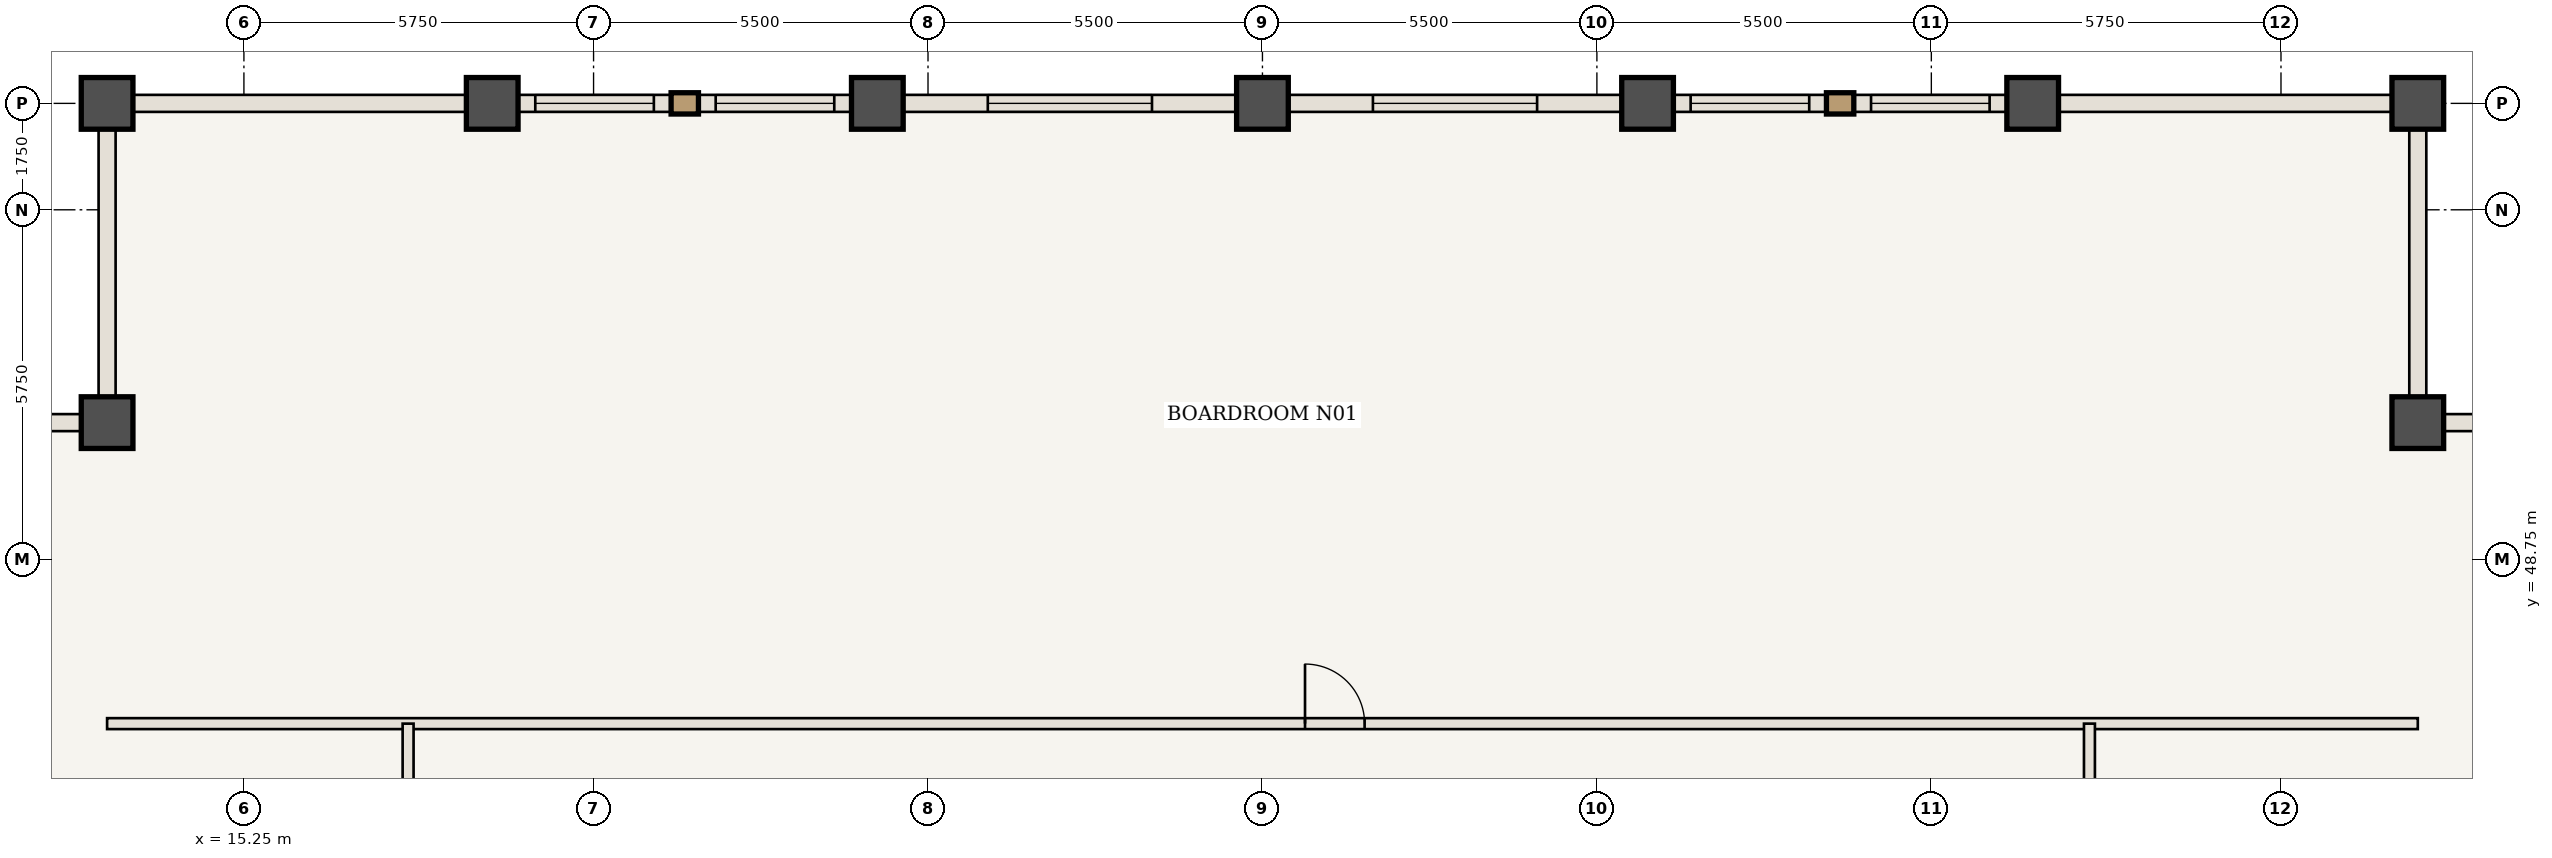
"""IFC4 building model, lengths in metres.
Left out: names, types, materials, properties, quantities, classifications, styles, units other than length and angle.
Written with IfcOpenShell. Run it as: python <this file> out.ifc"""

import sys

from ifc_helpers import new_model, si_unit, direction, frame, frame_2d, origin, origin_2d, place, context, subcontext, project, spatial, rectangle, extrude, element, fill, save


model = new_model("IFC4")
c1 = context("Model", 3, precision=1e-05, world=origin(), true_north=direction((0.0, 1.0)))
c2 = subcontext(c1, "Body", "Model", "MODEL_VIEW")
j1 = project(units=[si_unit("LENGTHUNIT", "METRE"), si_unit("PLANEANGLEUNIT", "RADIAN")], contexts=[c1])
p1 = place(None, origin())
s1 = spatial("IfcSite", under=j1, at=p1, CompositionType="ELEMENT")
p2 = place(p1, origin())
s2 = spatial("IfcBuilding", under=s1, at=p2, CompositionType="ELEMENT")
p3 = place(p2, frame((0.0, 0.0, 229.25)))
s3 = spatial("IfcBuildingStorey", under=s2, at=p3, CompositionType="ELEMENT", Elevation=229.25)
for number, where, z_axis, x_axis in (
    (1, (51.0, 51.0, 0.0), (0.0, 0.0, 1.0), (1.0, 0.0, 0.0)),
    (2, (51.0, 56.25, 0.0), (0.0, 0.0, 1.0), (1.0, 0.0, 0.0)),
    (3, (13.0, 56.25, 0.0), (0.0, 0.0, 1.0), (1.0, 0.0, 0.0)),
    (4, (13.0, 51.0, 0.0), (0.0, 0.0, 1.0), (1.0, 0.0, 0.0)),
    (5, (19.333, 56.25, 0.0), (0.0, 0.0, 1.0), (1.0, 0.0, 0.0)),
    (6, (25.667, 56.25, 0.0), (0.0, 0.0, 1.0), (1.0, 0.0, 0.0)),
    (7, (32.0, 56.25, 0.0), (0.0, 0.0, 1.0), (1.0, 0.0, 0.0)),
    (8, (38.333, 56.25, 0.0), (0.0, 0.0, 1.0), (1.0, 0.0, 0.0)),
    (9, (44.667, 56.25, 0.0), (0.0, 0.0, 1.0), (1.0, 0.0, 0.0)),
):
    element("IfcColumn", number, at=place(p3, frame(where, z_axis=z_axis, x_axis=x_axis)), inside=s3, PredefinedType="COLUMN", context=c2, shape_type="SweptSolid", body=[
        extrude(rectangle(XDim=0.85, YDim=0.85, at=origin_2d()), origin(), (0.0, 0.0, 1.0), 3.85),
    ])
p4 = place(p3, frame((13.0, 46.05, 0.0), z_axis=(0.0, 0.0, 1.0), x_axis=(1.0, 0.0, 0.0)))
e10 = element("IfcWall", 10, at=p4, inside=s3, PredefinedType="STANDARD", context=c2, shape_type="SweptSolid", body=[
    extrude(rectangle(XDim=38.0, YDim=0.18, at=frame_2d((19.0, 0.0))), origin(), (0.0, 0.0, 1.0), 3.685),
])
p5 = place(p4, frame((19.7, 0.0, 0.0)))
e11 = element("IfcOpeningElement", 11, at=p5, cuts=e10, PredefinedType="OPENING", context=c2, shape_type="SweptSolid", body=[
    extrude(rectangle(XDim=0.98, YDim=2.2, at=frame_2d((0.49, 1.1))), frame((0.0, 0.1, 0.0), z_axis=(0.0, -1.0, 0.0), x_axis=(1.0, 0.0, 0.0)), (0.0, 0.0, 1.0), 0.2),
])
p6 = place(p3, frame((17.95, 37.708, 0.0), z_axis=(0.0, 0.0, 1.0), x_axis=(0.0, 1.0, 0.0)))
e12 = element("IfcWall", 12, at=p6, inside=s3, PredefinedType="STANDARD", context=c2, shape_type="SweptSolid", body=[
    extrude(rectangle(XDim=8.342, YDim=0.18, at=frame_2d((4.171, 0.0))), origin(), (0.0, 0.0, 1.0), 3.685),
])
p7 = place(p6, frame((3.671, 0.0, 0.0)))
e13 = element("IfcOpeningElement", 13, at=p7, cuts=e12, PredefinedType="OPENING", context=c2, shape_type="SweptSolid", body=[
    extrude(rectangle(XDim=0.98, YDim=2.2, at=frame_2d((0.49, 1.1))), frame((0.0, 0.1, 0.0), z_axis=(0.0, -1.0, 0.0), x_axis=(1.0, 0.0, 0.0)), (0.0, 0.0, 1.0), 0.2),
])
p8 = place(p3, frame((45.6, 31.05, 0.0), z_axis=(0.0, 0.0, 1.0), x_axis=(0.0, 1.0, 0.0)))
e14 = element("IfcWall", 14, at=p8, inside=s3, PredefinedType="STANDARD", context=c2, shape_type="SweptSolid", body=[
    extrude(rectangle(XDim=15.0, YDim=0.18, at=frame_2d((7.5, 0.0))), origin(), (0.0, 0.0, 1.0), 3.685),
])
p9 = place(p8, frame((7.0, 0.0, 0.0)))
e15 = element("IfcOpeningElement", 15, at=p9, cuts=e14, PredefinedType="OPENING", context=c2, shape_type="SweptSolid", body=[
    extrude(rectangle(XDim=0.98, YDim=2.2, at=frame_2d((0.49, 1.1))), frame((0.0, 0.1, 0.0), z_axis=(0.0, -1.0, 0.0), x_axis=(1.0, 0.0, 0.0)), (0.0, 0.0, 1.0), 0.2),
])
p10 = place(p3, frame((13.0, 56.25, 0.0), z_axis=(0.0, 0.0, 1.0), x_axis=(1.0, 0.0, 0.0)))
e16 = element("IfcWall", 16, at=p10, inside=s3, PredefinedType="USERDEFINED", context=c2, shape_type="SweptSolid", body=[
    extrude(rectangle(XDim=6.333, YDim=0.28, at=frame_2d((3.167, 0.0))), origin(), (0.0, 0.0, 1.0), 2.985),
])
p11 = place(p3, frame((19.333, 56.25, 0.0), z_axis=(0.0, 0.0, 1.0), x_axis=(1.0, 0.0, 0.0)))
e17 = element("IfcWall", 17, at=p11, inside=s3, PredefinedType="USERDEFINED", context=c2, shape_type="SweptSolid", body=[
    extrude(rectangle(XDim=6.333, YDim=0.28, at=frame_2d((3.167, 0.0))), origin(), (0.0, 0.0, 1.0), 2.985),
])
p12 = place(p11, frame((0.708, 0.0, 0.85)))
e18 = element("IfcOpeningElement", 18, at=p12, cuts=e17, PredefinedType="OPENING", context=c2, shape_type="SweptSolid", body=[
    extrude(rectangle(XDim=1.95, YDim=1.935, at=frame_2d((0.975, 0.968))), frame((0.0, 0.15, 0.0), z_axis=(0.0, -1.0, 0.0), x_axis=(1.0, 0.0, 0.0)), (0.0, 0.0, 1.0), 0.3),
])
p13 = place(p11, frame((3.675, 0.0, 0.85)))
e19 = element("IfcOpeningElement", 19, at=p13, cuts=e17, PredefinedType="OPENING", context=c2, shape_type="SweptSolid", body=[
    extrude(rectangle(XDim=1.95, YDim=1.935, at=frame_2d((0.975, 0.968))), frame((0.0, 0.15, 0.0), z_axis=(0.0, -1.0, 0.0), x_axis=(1.0, 0.0, 0.0)), (0.0, 0.0, 1.0), 0.3),
])
p14 = place(p3, frame((25.667, 56.25, 0.0), z_axis=(0.0, 0.0, 1.0), x_axis=(1.0, 0.0, 0.0)))
e20 = element("IfcWall", 20, at=p14, inside=s3, PredefinedType="USERDEFINED", context=c2, shape_type="SweptSolid", body=[
    extrude(rectangle(XDim=6.333, YDim=0.28, at=frame_2d((3.167, 0.0))), origin(), (0.0, 0.0, 1.0), 2.985),
])
p15 = place(p14, frame((1.817, 0.0, 0.85)))
e21 = element("IfcOpeningElement", 21, at=p15, cuts=e20, PredefinedType="OPENING", context=c2, shape_type="SweptSolid", body=[
    extrude(rectangle(XDim=2.7, YDim=1.935, at=frame_2d((1.35, 0.968))), frame((0.0, 0.15, 0.0), z_axis=(0.0, -1.0, 0.0), x_axis=(1.0, 0.0, 0.0)), (0.0, 0.0, 1.0), 0.3),
])
p16 = place(p3, frame((32.0, 56.25, 0.0), z_axis=(0.0, 0.0, 1.0), x_axis=(1.0, 0.0, 0.0)))
e22 = element("IfcWall", 22, at=p16, inside=s3, PredefinedType="USERDEFINED", context=c2, shape_type="SweptSolid", body=[
    extrude(rectangle(XDim=6.333, YDim=0.28, at=frame_2d((3.167, 0.0))), origin(), (0.0, 0.0, 1.0), 2.985),
])
p17 = place(p16, frame((1.817, 0.0, 0.85)))
e23 = element("IfcOpeningElement", 23, at=p17, cuts=e22, PredefinedType="OPENING", context=c2, shape_type="SweptSolid", body=[
    extrude(rectangle(XDim=2.7, YDim=1.935, at=frame_2d((1.35, 0.968))), frame((0.0, 0.15, 0.0), z_axis=(0.0, -1.0, 0.0), x_axis=(1.0, 0.0, 0.0)), (0.0, 0.0, 1.0), 0.3),
])
p18 = place(p3, frame((38.333, 56.25, 0.0), z_axis=(0.0, 0.0, 1.0), x_axis=(1.0, 0.0, 0.0)))
e24 = element("IfcWall", 24, at=p18, inside=s3, PredefinedType="USERDEFINED", context=c2, shape_type="SweptSolid", body=[
    extrude(rectangle(XDim=6.333, YDim=0.28, at=frame_2d((3.167, 0.0))), origin(), (0.0, 0.0, 1.0), 2.985),
])
p19 = place(p18, frame((0.708, 0.0, 0.85)))
e25 = element("IfcOpeningElement", 25, at=p19, cuts=e24, PredefinedType="OPENING", context=c2, shape_type="SweptSolid", body=[
    extrude(rectangle(XDim=1.95, YDim=1.935, at=frame_2d((0.975, 0.968))), frame((0.0, 0.15, 0.0), z_axis=(0.0, -1.0, 0.0), x_axis=(1.0, 0.0, 0.0)), (0.0, 0.0, 1.0), 0.3),
])
p20 = place(p18, frame((3.675, 0.0, 0.85)))
e26 = element("IfcOpeningElement", 26, at=p20, cuts=e24, PredefinedType="OPENING", context=c2, shape_type="SweptSolid", body=[
    extrude(rectangle(XDim=1.95, YDim=1.935, at=frame_2d((0.975, 0.968))), frame((0.0, 0.15, 0.0), z_axis=(0.0, -1.0, 0.0), x_axis=(1.0, 0.0, 0.0)), (0.0, 0.0, 1.0), 0.3),
])
p21 = place(p3, frame((44.667, 56.25, 0.0), z_axis=(0.0, 0.0, 1.0), x_axis=(1.0, 0.0, 0.0)))
e27 = element("IfcWall", 27, at=p21, inside=s3, PredefinedType="USERDEFINED", context=c2, shape_type="SweptSolid", body=[
    extrude(rectangle(XDim=6.333, YDim=0.28, at=frame_2d((3.167, 0.0))), origin(), (0.0, 0.0, 1.0), 2.985),
])
for number, where, z_axis, x_axis in (
    (28, (51.0, 51.0, 0.0), (0.0, 0.0, 1.0), (1.0, 0.0, 0.0)),
    (29, (51.0, 56.25, 0.0), (0.0, 0.0, 1.0), (0.0, -1.0, 0.0)),
    (30, (13.0, 51.0, 0.0), (0.0, 0.0, 1.0), (0.0, 1.0, 0.0)),
    (31, (7.75, 51.0, 0.0), (0.0, 0.0, 1.0), (1.0, 0.0, 0.0)),
):
    element("IfcWall", number, at=place(p3, frame(where, z_axis=z_axis, x_axis=x_axis)), inside=s3, PredefinedType="USERDEFINED", context=c2, shape_type="SweptSolid", body=[
        extrude(rectangle(XDim=5.25, YDim=0.28, at=frame_2d((2.625, 0.0))), origin(), (0.0, 0.0, 1.0), 2.985),
    ])
p22 = place(p5, origin())
e32 = element("IfcDoor", 32, at=p22, inside=s3, OperationType="SINGLE_SWING_LEFT", PredefinedType="DOOR", context=c2, shape_type="SweptSolid", body=[
    extrude(rectangle(XDim=0.98, YDim=2.2, at=frame_2d((0.49, 1.1))), frame((0.0, 0.025, 0.0), z_axis=(0.0, -1.0, 0.0), x_axis=(1.0, 0.0, 0.0)), (0.0, 0.0, 1.0), 0.05),
])
fill(e11, e32)
p23 = place(p12, origin())
e33 = element("IfcWindow", 33, at=p23, inside=s3, PartitioningType="SINGLE_PANEL", PredefinedType="WINDOW", context=c2, shape_type="SweptSolid", body=[
    extrude(rectangle(XDim=1.95, YDim=1.935, at=frame_2d((0.975, 0.968))), frame((0.0, 0.03, 0.0), z_axis=(0.0, -1.0, 0.0), x_axis=(1.0, 0.0, 0.0)), (0.0, 0.0, 1.0), 0.06),
])
fill(e18, e33)
p24 = place(p13, origin())
e34 = element("IfcWindow", 34, at=p24, inside=s3, PartitioningType="SINGLE_PANEL", PredefinedType="WINDOW", context=c2, shape_type="SweptSolid", body=[
    extrude(rectangle(XDim=1.95, YDim=1.935, at=frame_2d((0.975, 0.968))), frame((0.0, 0.03, 0.0), z_axis=(0.0, -1.0, 0.0), x_axis=(1.0, 0.0, 0.0)), (0.0, 0.0, 1.0), 0.06),
])
fill(e19, e34)
p25 = place(p15, origin())
e35 = element("IfcWindow", 35, at=p25, inside=s3, PartitioningType="SINGLE_PANEL", PredefinedType="WINDOW", context=c2, shape_type="SweptSolid", body=[
    extrude(rectangle(XDim=2.7, YDim=1.935, at=frame_2d((1.35, 0.968))), frame((0.0, 0.03, 0.0), z_axis=(0.0, -1.0, 0.0), x_axis=(1.0, 0.0, 0.0)), (0.0, 0.0, 1.0), 0.06),
])
fill(e21, e35)
p26 = place(p17, origin())
e36 = element("IfcWindow", 36, at=p26, inside=s3, PartitioningType="SINGLE_PANEL", PredefinedType="WINDOW", context=c2, shape_type="SweptSolid", body=[
    extrude(rectangle(XDim=2.7, YDim=1.935, at=frame_2d((1.35, 0.968))), frame((0.0, 0.03, 0.0), z_axis=(0.0, -1.0, 0.0), x_axis=(1.0, 0.0, 0.0)), (0.0, 0.0, 1.0), 0.06),
])
fill(e23, e36)
p27 = place(p19, origin())
e37 = element("IfcWindow", 37, at=p27, inside=s3, PartitioningType="SINGLE_PANEL", PredefinedType="WINDOW", context=c2, shape_type="SweptSolid", body=[
    extrude(rectangle(XDim=1.95, YDim=1.935, at=frame_2d((0.975, 0.968))), frame((0.0, 0.03, 0.0), z_axis=(0.0, -1.0, 0.0), x_axis=(1.0, 0.0, 0.0)), (0.0, 0.0, 1.0), 0.06),
])
fill(e25, e37)
p28 = place(p20, origin())
e38 = element("IfcWindow", 38, at=p28, inside=s3, PartitioningType="SINGLE_PANEL", PredefinedType="WINDOW", context=c2, shape_type="SweptSolid", body=[
    extrude(rectangle(XDim=1.95, YDim=1.935, at=frame_2d((0.975, 0.968))), frame((0.0, 0.03, 0.0), z_axis=(0.0, -1.0, 0.0), x_axis=(1.0, 0.0, 0.0)), (0.0, 0.0, 1.0), 0.06),
])
fill(e26, e38)
save(model, sys.argv[1])
